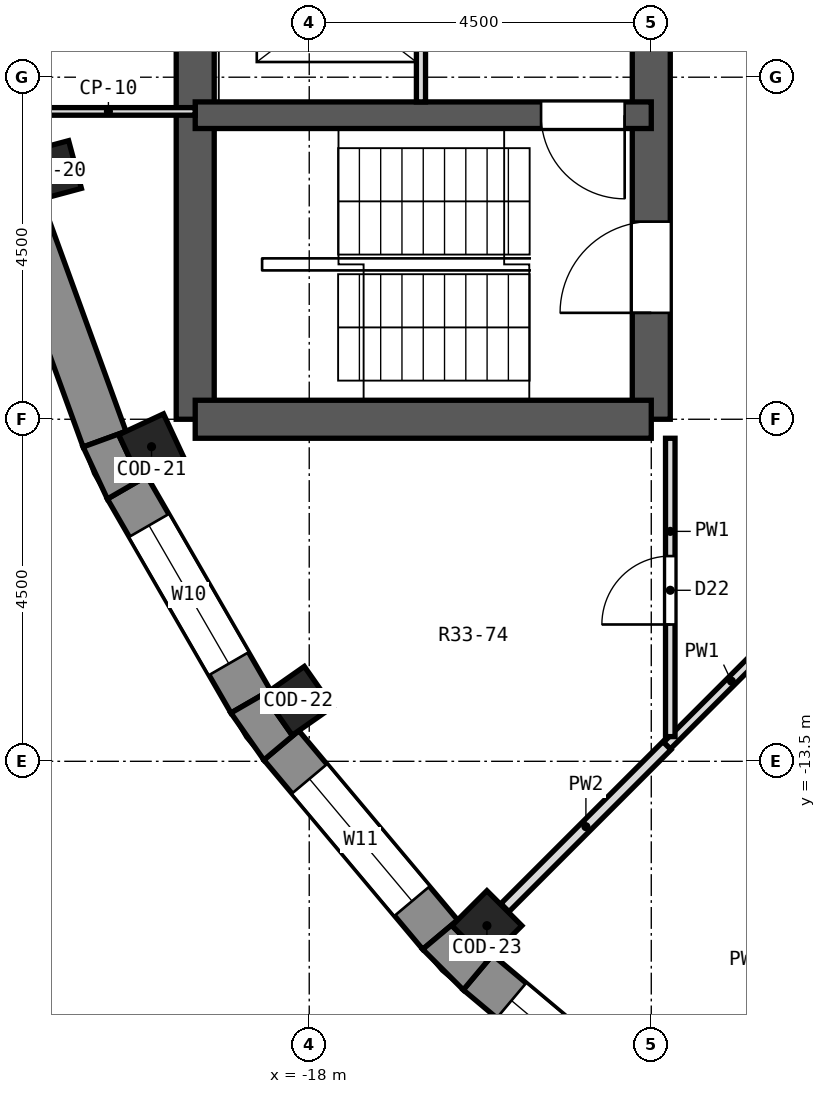
"""IFC4 building model, lengths in metres.
Left out: names, types, materials, properties, quantities, classifications, styles, units other than length and angle.
Written with IfcOpenShell. Run it as: python <this file> out.ifc"""

import sys

from ifc_helpers import new_model, si_unit, direction, frame, frame_2d, origin, origin_2d, place, context, subcontext, project, spatial, polyline, rectangle, outline, extrude, element, fill, save


model = new_model("IFC4")
c1 = context("Model", 3, precision=1e-05, world=origin(), true_north=direction((0.0, 1.0)))
c2 = subcontext(c1, "Body", "Model", "MODEL_VIEW")
j1 = project(units=[si_unit("LENGTHUNIT", "METRE"), si_unit("PLANEANGLEUNIT", "RADIAN")], contexts=[c1])
p1 = place(None, origin())
s1 = spatial("IfcSite", under=j1, at=p1, CompositionType="ELEMENT")
p2 = place(p1, origin())
s2 = spatial("IfcBuilding", under=s1, at=p2, CompositionType="ELEMENT")
p3 = place(p2, frame((0.0, 0.0, 229.7)))
s3 = spatial("IfcBuildingStorey", under=s2, at=p3, CompositionType="ELEMENT", Elevation=229.7)
for number, where, z_axis, x_axis in (
    (1, (-21.395, -5.733, 0.0), (0.0, 0.0, 1.0), (-0.966, -0.259, 0.0)),
    (2, (-20.075, -9.361, 0.0), (0.0, 0.0, 1.0), (-0.906, -0.423, 0.0)),
    (3, (-18.144, -12.705, 0.0), (0.0, 0.0, 1.0), (-0.819, -0.574, 0.0)),
    (4, (-15.662, -15.662, 0.0), (0.0, 0.0, 1.0), (-0.707, -0.707, 0.0)),
):
    element("IfcColumn", number, at=place(p3, frame(where, z_axis=z_axis, x_axis=x_axis)), inside=s3, PredefinedType="COLUMN", context=c2, shape_type="SweptSolid", body=[
        extrude(rectangle(XDim=0.65, YDim=0.65, at=origin_2d()), origin(), (0.0, 0.0, 1.0), 3.3),
    ])
p4 = place(p3, frame((-13.5, -9.0, 0.0), z_axis=(0.0, 0.0, 1.0), x_axis=(0.0, 1.0, 0.0)))
e5 = element("IfcWall", 5, at=p4, inside=s3, PredefinedType="SHEAR", context=c2, shape_type="SweptSolid", body=[
    extrude(rectangle(XDim=18.0, YDim=0.5, at=frame_2d((9.0, 0.0))), origin(), (0.0, 0.0, 1.0), 3.3),
])
p5 = place(p4, frame((15.4, 0.0, 0.0)))
e6 = element("IfcOpeningElement", 6, at=p5, cuts=e5, PredefinedType="OPENING", context=c2, shape_type="SweptSolid", body=[
    extrude(rectangle(XDim=1.2, YDim=2.1, at=frame_2d((0.6, 1.05))), frame((0.0, 0.262, 0.0), z_axis=(0.0, -1.0, 0.0), x_axis=(1.0, 0.0, 0.0)), (0.0, 0.0, 1.0), 0.524),
])
p6 = place(p4, frame((1.4, 0.0, 0.0)))
e7 = element("IfcOpeningElement", 7, at=p6, cuts=e5, PredefinedType="OPENING", context=c2, shape_type="SweptSolid", body=[
    extrude(rectangle(XDim=1.2, YDim=2.1, at=frame_2d((0.6, 1.05))), frame((0.0, 0.262, 0.0), z_axis=(0.0, -1.0, 0.0), x_axis=(1.0, 0.0, 0.0)), (0.0, 0.0, 1.0), 0.524),
])
p7 = place(p4, frame((7.5, 0.0, 0.0)))
e8 = element("IfcOpeningElement", 8, at=p7, cuts=e5, PredefinedType="OPENING", context=c2, shape_type="SweptSolid", body=[
    extrude(rectangle(XDim=3.0, YDim=2.4, at=frame_2d((1.5, 1.2))), frame((0.0, 0.262, 0.0), z_axis=(0.0, -1.0, 0.0), x_axis=(1.0, 0.0, 0.0)), (0.0, 0.0, 1.0), 0.524),
])
p8 = place(p3, frame((-19.5, -9.0, 0.0), z_axis=(0.0, 0.0, 1.0), x_axis=(0.0, 1.0, 0.0)))
e9 = element("IfcWall", 9, at=p8, inside=s3, PredefinedType="SHEAR", context=c2, shape_type="SweptSolid", body=[
    extrude(rectangle(XDim=18.0, YDim=0.5, at=frame_2d((9.0, 0.0))), origin(), (0.0, 0.0, 1.0), 3.3),
])
p9 = place(p8, frame((9.45, 0.0, 0.0)))
e10 = element("IfcOpeningElement", 10, at=p9, cuts=e9, PredefinedType="OPENING", context=c2, shape_type="SweptSolid", body=[
    extrude(rectangle(XDim=0.9, YDim=2.1, at=frame_2d((0.45, 1.05))), frame((0.0, 0.262, 0.0), z_axis=(0.0, -1.0, 0.0), x_axis=(1.0, 0.0, 0.0)), (0.0, 0.0, 1.0), 0.524),
])
p10 = place(p8, frame((7.65, 0.0, 0.0)))
e11 = element("IfcOpeningElement", 11, at=p10, cuts=e9, PredefinedType="OPENING", context=c2, shape_type="SweptSolid", body=[
    extrude(rectangle(XDim=0.9, YDim=2.1, at=frame_2d((0.45, 1.05))), frame((0.0, 0.262, 0.0), z_axis=(0.0, -1.0, 0.0), x_axis=(1.0, 0.0, 0.0)), (0.0, 0.0, 1.0), 0.524),
])
p11 = place(p3, frame((-13.5, -9.0, 0.0), z_axis=(0.0, 0.0, 1.0), x_axis=(-1.0, 0.0, 0.0)))
e12 = element("IfcWall", 12, at=p11, inside=s3, PredefinedType="SHEAR", context=c2, shape_type="SweptSolid", body=[
    extrude(rectangle(XDim=6.0, YDim=0.5, at=frame_2d((3.0, 0.0))), origin(), (0.0, 0.0, 1.0), 3.3),
])
p12 = place(p3, frame((-13.5, -5.0, 0.0), z_axis=(0.0, 0.0, 1.0), x_axis=(-1.0, 0.0, 0.0)))
e13 = element("IfcWall", 13, at=p12, inside=s3, PredefinedType="SHEAR", context=c2, shape_type="SweptSolid", body=[
    extrude(rectangle(XDim=6.0, YDim=0.35, at=frame_2d((3.0, 0.0))), origin(), (0.0, 0.0, 1.0), 3.3),
])
p13 = place(p12, frame((0.35, 0.0, 0.0)))
e14 = element("IfcOpeningElement", 14, at=p13, cuts=e13, PredefinedType="OPENING", context=c2, shape_type="SweptSolid", body=[
    extrude(rectangle(XDim=1.1, YDim=2.1, at=frame_2d((0.55, 1.05))), frame((0.0, 0.187, 0.0), z_axis=(0.0, -1.0, 0.0), x_axis=(1.0, 0.0, 0.0)), (0.0, 0.0, 1.0), 0.374),
])
p14 = place(p3, frame((-21.805, -6.206, 0.0), z_axis=(0.0, 0.0, 1.0), x_axis=(0.342056509473, -0.939679383794, 0.0)))
e15 = element("IfcWall", 15, at=p14, inside=s3, PredefinedType="SOLIDWALL", context=c2, shape_type="SweptSolid", body=[
    extrude(rectangle(XDim=3.252, YDim=0.6, at=frame_2d((1.626, 0.0))), origin(), (0.0, 0.0, 1.0), 2.9),
])
p15 = place(p3, frame((-20.396, -9.898, 0.0), z_axis=(0.0, 0.0, 1.0), x_axis=(0.500014901547, -0.866016800201, 0.0)))
e16 = element("IfcWall", 16, at=p15, inside=s3, PredefinedType="SOLIDWALL", context=c2, shape_type="SweptSolid", body=[
    extrude(rectangle(XDim=3.252, YDim=0.6, at=frame_2d((1.626, 0.0))), origin(), (0.0, 0.0, 1.0), 2.9),
])
p16 = place(p15, frame((0.576, 0.0, 0.9)))
e17 = element("IfcOpeningElement", 17, at=p16, cuts=e16, PredefinedType="OPENING", context=c2, shape_type="SweptSolid", body=[
    extrude(rectangle(XDim=2.1, YDim=1.8, at=frame_2d((1.05, 0.9))), frame((0.0, 0.312, 0.0), z_axis=(0.0, -1.0, 0.0), x_axis=(1.0, 0.0, 0.0)), (0.0, 0.0, 1.0), 0.624),
])
p17 = place(p3, frame((-18.367, -13.29, 0.0), z_axis=(0.0, 0.0, 1.0), x_axis=(0.64277291405, -0.766056773982, 0.0)))
e18 = element("IfcWall", 18, at=p17, inside=s3, PredefinedType="SOLIDWALL", context=c2, shape_type="SweptSolid", body=[
    extrude(rectangle(XDim=3.252, YDim=0.6, at=frame_2d((1.626, 0.0))), origin(), (0.0, 0.0, 1.0), 2.9),
])
p18 = place(p17, frame((0.576, 0.0, 0.9)))
e19 = element("IfcOpeningElement", 19, at=p18, cuts=e18, PredefinedType="OPENING", context=c2, shape_type="SweptSolid", body=[
    extrude(rectangle(XDim=2.1, YDim=1.8, at=frame_2d((1.05, 0.9))), frame((0.0, 0.312, 0.0), z_axis=(0.0, -1.0, 0.0), x_axis=(1.0, 0.0, 0.0)), (0.0, 0.0, 1.0), 0.624),
])
p19 = place(p3, frame((-15.781, -16.277, 0.0), z_axis=(0.0, 0.0, 1.0), x_axis=(0.766056773982, -0.64277291405, 0.0)))
e20 = element("IfcWall", 20, at=p19, inside=s3, PredefinedType="SOLIDWALL", context=c2, shape_type="SweptSolid", body=[
    extrude(rectangle(XDim=3.252, YDim=0.6, at=frame_2d((1.626, 0.0))), origin(), (0.0, 0.0, 1.0), 2.9),
])
p20 = place(p19, frame((0.576, 0.0, 0.9)))
e21 = element("IfcOpeningElement", 21, at=p20, cuts=e20, PredefinedType="OPENING", context=c2, shape_type="SweptSolid", body=[
    extrude(rectangle(XDim=2.1, YDim=1.8, at=frame_2d((1.05, 0.9))), frame((0.0, 0.312, 0.0), z_axis=(0.0, -1.0, 0.0), x_axis=(1.0, 0.0, 0.0)), (0.0, 0.0, 1.0), 0.624),
])
p21 = place(p3, origin())
e22 = element("IfcWall", 22, at=p21, inside=s3, PredefinedType="SOLIDWALL", context=c2, shape_type="SweptSolid", body=[
    extrude(outline(polyline([(-20.975, -9.364), (-20.656, -10.048), (-20.136, -9.748), (-20.232, -9.793), (-20.507, -9.204), (-20.411, -9.159), (-20.975, -9.364)])), origin(), (0.0, 0.0, 1.0), 2.9),
])
p22 = place(p3, origin())
e23 = element("IfcWall", 23, at=p22, inside=s3, PredefinedType="SOLIDWALL", context=c2, shape_type="SweptSolid", body=[
    extrude(outline(polyline([(-19.03, -12.864), (-18.597, -13.482), (-18.137, -13.097), (-18.224, -13.157), (-18.597, -12.625), (-18.51, -12.564), (-19.03, -12.864)])), origin(), (0.0, 0.0, 1.0), 2.9),
])
p23 = place(p3, origin())
e24 = element("IfcWall", 24, at=p23, inside=s3, PredefinedType="SOLIDWALL", context=c2, shape_type="SweptSolid", body=[
    extrude(outline(polyline([(-15.973, -16.507), (-15.588, -16.047), (-15.662, -16.122), (-16.122, -15.662), (-16.047, -15.588), (-16.507, -15.973), (-15.973, -16.507)])), origin(), (0.0, 0.0, 1.0), 2.9),
])
p24 = place(p3, frame((-13.294, -13.294, 0.0), z_axis=(0.0, 0.0, 1.0), x_axis=(0.707106781187, 0.707106781187, 0.0)))
e25 = element("IfcWall", 25, at=p24, inside=s3, PredefinedType="PARTITIONING", context=c2, shape_type="SweptSolid", body=[
    extrude(rectangle(XDim=4.131, YDim=0.125, at=frame_2d((2.065, 0.0))), origin(), (0.0, 0.0, 1.0), 2.9),
])
p25 = place(p24, frame((1.678, 0.0, 0.0)))
e26 = element("IfcOpeningElement", 26, at=p25, cuts=e25, PredefinedType="OPENING", context=c2, shape_type="SweptSolid", body=[
    extrude(rectangle(XDim=0.9, YDim=2.1, at=frame_2d((0.45, 1.05))), frame((0.0, 0.074, 0.0), z_axis=(0.0, -1.0, 0.0), x_axis=(1.0, 0.0, 0.0)), (0.0, 0.0, 1.0), 0.149),
])
p26 = place(p3, frame((-15.426, -15.426, 0.0), z_axis=(0.0, 0.0, 1.0), x_axis=(0.707106781187, 0.707106781187, 0.0)))
e27 = element("IfcWall", 27, at=p26, inside=s3, PredefinedType="PARTITIONING", context=c2, shape_type="SweptSolid", body=[
    extrude(rectangle(XDim=3.014, YDim=0.15, at=frame_2d((1.507, 0.0))), origin(), (0.0, 0.0, 1.0), 2.9),
])
p27 = place(p3, frame((-12.513, -17.87, 0.0), z_axis=(0.0, 0.0, 1.0), x_axis=(0.573618789706, 0.819122386519, 0.0)))
e28 = element("IfcWall", 28, at=p27, inside=s3, PredefinedType="PARTITIONING", context=c2, shape_type="SweptSolid", body=[
    extrude(rectangle(XDim=1.676, YDim=0.125, at=frame_2d((0.838, 0.0))), origin(), (0.0, 0.0, 1.0), 2.9),
])
p28 = place(p27, frame((0.123, 0.0, 0.0)))
e29 = element("IfcOpeningElement", 29, at=p28, cuts=e28, PredefinedType="OPENING", context=c2, shape_type="SweptSolid", body=[
    extrude(rectangle(XDim=0.9, YDim=2.1, at=frame_2d((0.45, 1.05))), frame((0.0, 0.074, 0.0), z_axis=(0.0, -1.0, 0.0), x_axis=(1.0, 0.0, 0.0)), (0.0, 0.0, 1.0), 0.149),
])
p29 = place(p3, frame((-13.25, -13.175, 0.0), z_axis=(0.0, 0.0, 1.0), x_axis=(0.0, 1.0, 0.0)))
e30 = element("IfcWall", 30, at=p29, inside=s3, PredefinedType="PARTITIONING", context=c2, shape_type="SweptSolid", body=[
    extrude(rectangle(XDim=3.925, YDim=0.125, at=frame_2d((1.962, 0.0))), origin(), (0.0, 0.0, 1.0), 2.9),
])
p30 = place(p29, frame((1.475, 0.0, 0.0)))
e31 = element("IfcOpeningElement", 31, at=p30, cuts=e30, PredefinedType="OPENING", context=c2, shape_type="SweptSolid", body=[
    extrude(rectangle(XDim=0.9, YDim=2.1, at=frame_2d((0.45, 1.05))), frame((0.0, 0.074, 0.0), z_axis=(0.0, -1.0, 0.0), x_axis=(1.0, 0.0, 0.0)), (0.0, 0.0, 1.0), 0.149),
])
p31 = place(p3, frame((-19.5, -4.95, 0.0), z_axis=(0.0, 0.0, 1.0), x_axis=(-1.0, 0.0, 0.0)))
e32 = element("IfcWall", 32, at=p31, inside=s3, PredefinedType="PARTITIONING", context=c2, shape_type="SweptSolid", body=[
    extrude(rectangle(XDim=2.284, YDim=0.1, at=frame_2d((1.142, 0.0))), origin(), (0.0, 0.0, 1.0), 2.9),
])
p32 = place(p3, frame((-16.53, -4.825, 0.0), z_axis=(0.0, 0.0, 1.0), x_axis=(0.0, 1.0, 0.0)))
e33 = element("IfcWall", 33, at=p32, inside=s3, PredefinedType="PARTITIONING", context=c2, shape_type="SweptSolid", body=[
    extrude(rectangle(XDim=2.65, YDim=0.12, at=frame_2d((1.325, 0.0))), origin(), (0.0, 0.0, 1.0), 2.9),
])
p33 = place(p32, frame((0.775, 0.0, 0.0)))
e34 = element("IfcOpeningElement", 34, at=p33, cuts=e33, PredefinedType="OPENING", context=c2, shape_type="SweptSolid", body=[
    extrude(rectangle(XDim=1.1, YDim=2.1, at=frame_2d((0.55, 1.05))), frame((0.0, 0.072, 0.0), z_axis=(0.0, -1.0, 0.0), x_axis=(1.0, 0.0, 0.0)), (0.0, 0.0, 1.0), 0.144),
])
p34 = place(p16, origin())
e35 = element("IfcWindow", 35, at=p34, inside=s3, PartitioningType="SINGLE_PANEL", PredefinedType="WINDOW", context=c2, shape_type="SweptSolid", body=[
    extrude(rectangle(XDim=2.1, YDim=1.8, at=frame_2d((1.05, 0.9))), frame((0.0, 0.18, 0.0), z_axis=(0.0, -1.0, 0.0), x_axis=(1.0, 0.0, 0.0)), (0.0, 0.0, 1.0), 0.06),
])
fill(e17, e35)
p35 = place(p18, origin())
e36 = element("IfcWindow", 36, at=p35, inside=s3, PartitioningType="SINGLE_PANEL", PredefinedType="WINDOW", context=c2, shape_type="SweptSolid", body=[
    extrude(rectangle(XDim=2.1, YDim=1.8, at=frame_2d((1.05, 0.9))), frame((0.0, 0.18, 0.0), z_axis=(0.0, -1.0, 0.0), x_axis=(1.0, 0.0, 0.0)), (0.0, 0.0, 1.0), 0.06),
])
fill(e19, e36)
p36 = place(p20, origin())
e37 = element("IfcWindow", 37, at=p36, inside=s3, PartitioningType="SINGLE_PANEL", PredefinedType="WINDOW", context=c2, shape_type="SweptSolid", body=[
    extrude(rectangle(XDim=2.1, YDim=1.8, at=frame_2d((1.05, 0.9))), frame((0.0, 0.18, 0.0), z_axis=(0.0, -1.0, 0.0), x_axis=(1.0, 0.0, 0.0)), (0.0, 0.0, 1.0), 0.06),
])
fill(e21, e37)
p37 = place(p30, origin())
e38 = element("IfcDoor", 38, at=p37, inside=s3, OperationType="SINGLE_SWING_LEFT", PredefinedType="DOOR", context=c2, shape_type="SweptSolid", body=[
    extrude(rectangle(XDim=0.9, YDim=2.1, at=frame_2d((0.45, 1.05))), frame((0.0, 0.025, 0.0), z_axis=(0.0, -1.0, 0.0), x_axis=(1.0, 0.0, 0.0)), (0.0, 0.0, 1.0), 0.05),
])
fill(e31, e38)
p38 = place(p13, origin())
e39 = element("IfcDoor", 39, at=p38, inside=s3, OperationType="SINGLE_SWING_LEFT", PredefinedType="DOOR", context=c2, shape_type="SweptSolid", body=[
    extrude(rectangle(XDim=1.1, YDim=2.1, at=frame_2d((0.55, 1.05))), frame((0.0, 0.025, 0.0), z_axis=(0.0, -1.0, 0.0), x_axis=(1.0, 0.0, 0.0)), (0.0, 0.0, 1.0), 0.05),
])
fill(e14, e39)
p39 = place(p6, origin())
e40 = element("IfcDoor", 40, at=p39, inside=s3, OperationType="SINGLE_SWING_LEFT", PredefinedType="DOOR", context=c2, shape_type="SweptSolid", body=[
    extrude(rectangle(XDim=1.2, YDim=2.1, at=frame_2d((0.6, 1.05))), frame((0.0, 0.025, 0.0), z_axis=(0.0, -1.0, 0.0), x_axis=(1.0, 0.0, 0.0)), (0.0, 0.0, 1.0), 0.05),
])
fill(e7, e40)
save(model, sys.argv[1])
